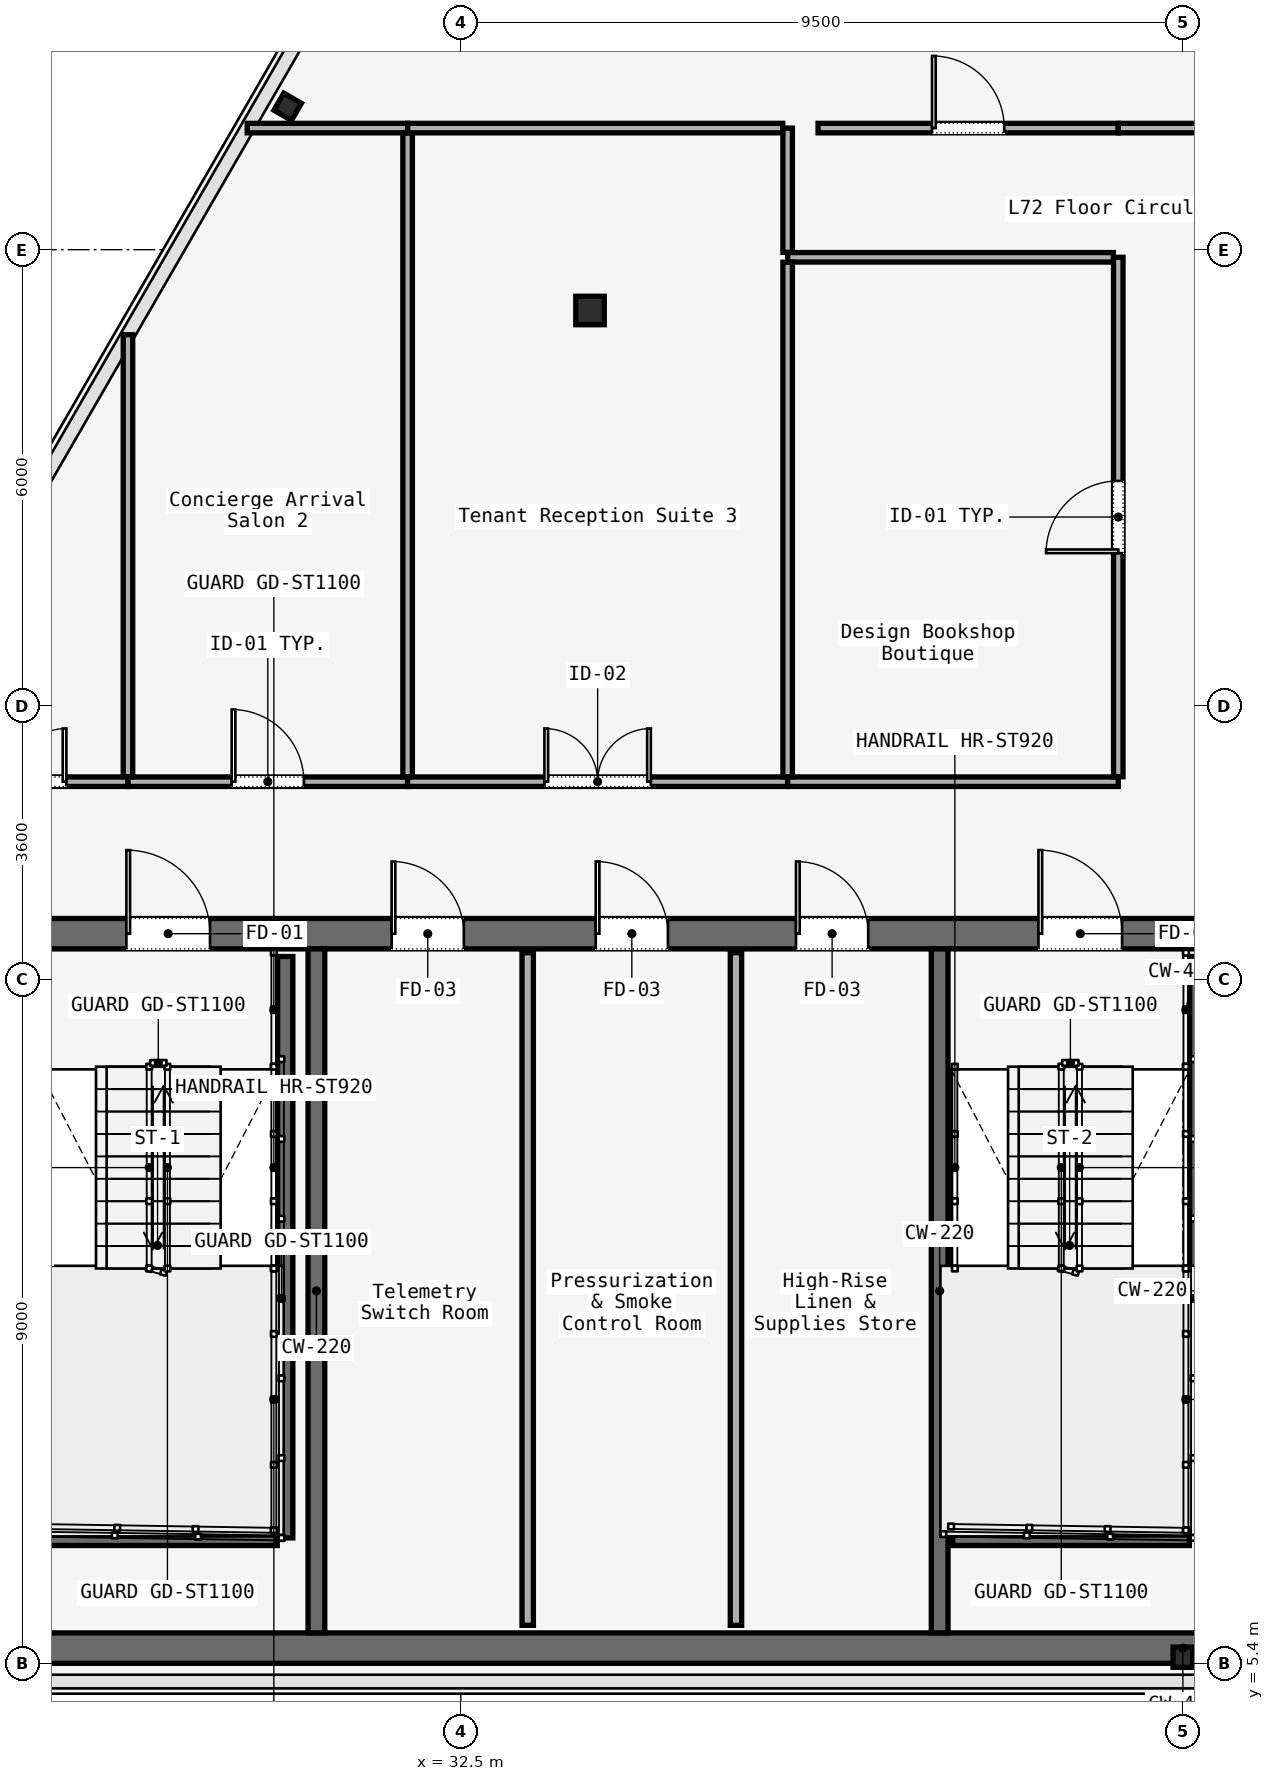
"""IFC4 building model, lengths in metres.
Left out: names, types, materials, properties, quantities, classifications, styles, units other than length and angle.
Written with IfcOpenShell. Run it as: python <this file> out.ifc"""

import sys

from ifc_helpers import new_model, si_unit, direction, frame, frame_2d, origin, origin_2d, place, context, subcontext, project, spatial, rectangle, i_section, extrude, element, fill, save


model = new_model("IFC4")
c1 = context("Model", 3, precision=1e-05, world=origin(), true_north=direction((0.0, 1.0)))
c2 = subcontext(c1, "Body", "Model", "MODEL_VIEW")
j1 = project(units=[si_unit("LENGTHUNIT", "METRE"), si_unit("PLANEANGLEUNIT", "RADIAN")], contexts=[c1])
p1 = place(None, origin())
s1 = spatial("IfcSite", under=j1, at=p1, CompositionType="ELEMENT")
p2 = place(p1, origin())
s2 = spatial("IfcBuilding", under=s1, at=p2, CompositionType="ELEMENT")
p3 = place(p2, frame((0.0, 0.0, 294.7)))
s3 = spatial("IfcBuildingStorey", under=s2, at=p3, CompositionType="ELEMENT", Elevation=294.7)
p4 = place(p3, frame((26.45, 15.0, 0.0), z_axis=(0.0, 0.0, 1.0), x_axis=(1.0, 0.0, 0.0)))
e1 = element("IfcWall", 1, at=p4, inside=s3, PredefinedType="SOLIDWALL", context=c2, shape_type="SweptSolid", body=[
    extrude(rectangle(XDim=31.1, YDim=0.4, at=frame_2d((15.55, 0.0))), origin(), (0.0, 0.0, 1.0), 3.52),
])
p5 = place(p4, frame((1.65, 0.0, 0.0)))
e2 = element("IfcOpeningElement", 2, at=p5, cuts=e1, PredefinedType="OPENING", context=c2, shape_type="SweptSolid", body=[
    extrude(rectangle(XDim=1.1, YDim=2.2, at=frame_2d((0.55, 1.1))), frame((0.0, 0.2, 0.0), z_axis=(0.0, -1.0, 0.0), x_axis=(1.0, 0.0, 0.0)), (0.0, 0.0, 1.0), 0.4),
])
p6 = place(p4, frame((13.65, 0.0, 0.0)))
e3 = element("IfcOpeningElement", 3, at=p6, cuts=e1, PredefinedType="OPENING", context=c2, shape_type="SweptSolid", body=[
    extrude(rectangle(XDim=1.1, YDim=2.2, at=frame_2d((0.55, 1.1))), frame((0.0, 0.2, 0.0), z_axis=(0.0, -1.0, 0.0), x_axis=(1.0, 0.0, 0.0)), (0.0, 0.0, 1.0), 0.4),
])
p7 = place(p4, frame((25.55, 0.0, 0.0)))
e4 = element("IfcOpeningElement", 4, at=p7, cuts=e1, PredefinedType="OPENING", context=c2, shape_type="SweptSolid", body=[
    extrude(rectangle(XDim=1.1, YDim=2.2, at=frame_2d((0.55, 1.1))), frame((0.0, 0.2, 0.0), z_axis=(0.0, -1.0, 0.0), x_axis=(1.0, 0.0, 0.0)), (0.0, 0.0, 1.0), 0.4),
])
p8 = place(p4, frame((19.35, 0.0, 0.0)))
e5 = element("IfcOpeningElement", 5, at=p8, cuts=e1, PredefinedType="OPENING", context=c2, shape_type="SweptSolid", body=[
    extrude(rectangle(XDim=1.1, YDim=2.2, at=frame_2d((0.55, 1.1))), frame((0.0, 0.2, 0.0), z_axis=(0.0, -1.0, 0.0), x_axis=(1.0, 0.0, 0.0)), (0.0, 0.0, 1.0), 0.4),
])
p9 = place(p4, frame((21.4, 0.0, 0.0)))
e6 = element("IfcOpeningElement", 6, at=p9, cuts=e1, PredefinedType="OPENING", context=c2, shape_type="SweptSolid", body=[
    extrude(rectangle(XDim=0.9, YDim=2.1, at=frame_2d((0.45, 1.05))), frame((0.0, 0.2, 0.0), z_axis=(0.0, -1.0, 0.0), x_axis=(1.0, 0.0, 0.0)), (0.0, 0.0, 1.0), 0.4),
])
p10 = place(p4, frame((5.14, 0.0, 0.0)))
e7 = element("IfcOpeningElement", 7, at=p10, cuts=e1, PredefinedType="OPENING", context=c2, shape_type="SweptSolid", body=[
    extrude(rectangle(XDim=0.95, YDim=2.2, at=frame_2d((0.475, 1.1))), frame((0.0, 0.2, 0.0), z_axis=(0.0, -1.0, 0.0), x_axis=(1.0, 0.0, 0.0)), (0.0, 0.0, 1.0), 0.4),
])
p11 = place(p4, frame((7.825, 0.0, 0.0)))
e8 = element("IfcOpeningElement", 8, at=p11, cuts=e1, PredefinedType="OPENING", context=c2, shape_type="SweptSolid", body=[
    extrude(rectangle(XDim=0.95, YDim=2.2, at=frame_2d((0.475, 1.1))), frame((0.0, 0.2, 0.0), z_axis=(0.0, -1.0, 0.0), x_axis=(1.0, 0.0, 0.0)), (0.0, 0.0, 1.0), 0.4),
])
p12 = place(p4, frame((10.46, 0.0, 0.0)))
e9 = element("IfcOpeningElement", 9, at=p12, cuts=e1, PredefinedType="OPENING", context=c2, shape_type="SweptSolid", body=[
    extrude(rectangle(XDim=0.95, YDim=2.2, at=frame_2d((0.475, 1.1))), frame((0.0, 0.2, 0.0), z_axis=(0.0, -1.0, 0.0), x_axis=(1.0, 0.0, 0.0)), (0.0, 0.0, 1.0), 0.4),
])
p13 = place(p4, frame((23.35, 0.0, 0.0)))
e10 = element("IfcOpeningElement", 10, at=p13, cuts=e1, PredefinedType="OPENING", context=c2, shape_type="SweptSolid", body=[
    extrude(rectangle(XDim=1.3, YDim=2.3, at=frame_2d((0.65, 1.15))), frame((0.0, 0.2, 0.0), z_axis=(0.0, -1.0, 0.0), x_axis=(1.0, 0.0, 0.0)), (0.0, 0.0, 1.0), 0.4),
])
p14 = place(p3, frame((26.45, 5.6, 0.0), z_axis=(0.0, 0.0, 1.0), x_axis=(1.0, 0.0, 0.0)))
e11 = element("IfcWall", 11, at=p14, inside=s3, PredefinedType="SOLIDWALL", context=c2, shape_type="SweptSolid", body=[
    extrude(rectangle(XDim=31.1, YDim=0.4, at=frame_2d((15.55, 0.0))), origin(), (0.0, 0.0, 1.0), 3.52),
])
for number, where, z_axis, x_axis in (
    (12, (30.6, 5.8, 0.0), (0.0, 0.0, 1.0), (0.0, 1.0, 0.0)),
    (13, (38.8, 5.8, 0.0), (0.0, 0.0, 1.0), (0.0, 1.0, 0.0)),
):
    element("IfcWall", number, at=place(p3, frame(where, z_axis=z_axis, x_axis=x_axis)), inside=s3, PredefinedType="SOLIDWALL", context=c2, shape_type="SweptSolid", body=[
        extrude(rectangle(XDim=9.0, YDim=0.22, at=frame_2d((4.5, 0.0))), origin(), (0.0, 0.0, 1.0), 3.52),
    ])
p15 = place(p3, frame((34.2, 23.2, 0.0), z_axis=(0.0, 0.0, 1.0), x_axis=(1.0, 0.0, 0.0)))
e14 = element("IfcColumn", 14, at=p15, inside=s3, PredefinedType="COLUMN", context=c2, shape_type="SweptSolid", body=[
    extrude(i_section(OverallWidth=0.375, OverallDepth=0.375, WebThickness=0.017, FlangeThickness=0.027, FilletRadius=0.015, at=origin_2d()), origin(), (0.0, 0.0, 1.0), 3.52),
])
p16 = place(p3, frame((42.0, 5.48, 0.0), z_axis=(0.0, 0.0, 1.0), x_axis=(1.0, 0.0, 0.0)))
e15 = element("IfcColumn", 15, at=p16, inside=s3, PredefinedType="COLUMN", context=c2, shape_type="SweptSolid", body=[
    extrude(i_section(OverallWidth=0.259, OverallDepth=0.267, WebThickness=0.013, FlangeThickness=0.021, FilletRadius=0.013, at=origin_2d()), origin(), (0.0, 0.0, 1.0), 3.52),
])
p17 = place(p3, frame((30.222, 25.881, 0.0), z_axis=(0.022172660725, -0.03838641888, 0.999016944782), x_axis=(0.000225551712, 0.999262773798, 0.038390858658)))
e16 = element("IfcColumn", 16, at=p17, inside=s3, PredefinedType="COLUMN", context=c2, shape_type="SweptSolid", body=[
    extrude(i_section(OverallWidth=0.259, OverallDepth=0.267, WebThickness=0.013, FlangeThickness=0.021, FilletRadius=0.013, at=origin_2d()), origin(), (0.0, 0.0, 1.0), 3.523),
])
p18 = place(p3, frame((30.19, 14.7, 0.0), z_axis=(0.0, 0.0, 1.0), x_axis=(0.0, -1.0, 0.0)))
e17 = element("IfcWall", 17, at=p18, inside=s3, PredefinedType="SOLIDWALL", context=c2, shape_type="SweptSolid", body=[
    extrude(rectangle(XDim=7.65, YDim=0.2, at=frame_2d((3.825, 0.0))), origin(), (0.0, 0.0, 1.0), 3.8),
])
p19 = place(p3, frame((26.97, 7.05, 0.0), z_axis=(0.0, 0.0, 1.0), x_axis=(1.0, 0.0, 0.0)))
e18 = element("IfcWall", 18, at=p19, inside=s3, PredefinedType="SOLIDWALL", context=c2, shape_type="SweptSolid", body=[
    extrude(rectangle(XDim=3.115, YDim=0.2, at=frame_2d((1.558, 0.0))), origin(), (0.0, 0.0, 1.0), 3.8),
])
p20 = place(p3, frame((42.19, 14.7, 0.0), z_axis=(0.0, 0.0, 1.0), x_axis=(0.0, -1.0, 0.0)))
e19 = element("IfcWall", 19, at=p20, inside=s3, PredefinedType="SOLIDWALL", context=c2, shape_type="SweptSolid", body=[
    extrude(rectangle(XDim=7.65, YDim=0.2, at=frame_2d((3.825, 0.0))), origin(), (0.0, 0.0, 1.0), 3.8),
])
p21 = place(p3, frame((38.97, 7.05, 0.0), z_axis=(0.0, 0.0, 1.0), x_axis=(1.0, 0.0, 0.0)))
e20 = element("IfcWall", 20, at=p21, inside=s3, PredefinedType="SOLIDWALL", context=c2, shape_type="SweptSolid", body=[
    extrude(rectangle(XDim=3.115, YDim=0.2, at=frame_2d((1.558, 0.0))), origin(), (0.0, 0.0, 1.0), 3.8),
])
for number, where, z_axis, x_axis in (
    (21, (33.38, 5.9, 0.0), (0.0, 0.0, 1.0), (0.0, 1.0, 0.0)),
    (22, (36.12, 5.9, 0.0), (0.0, 0.0, 1.0), (0.0, 1.0, 0.0)),
):
    element("IfcWall", number, at=place(p3, frame(where, z_axis=z_axis, x_axis=x_axis)), inside=s3, PredefinedType="PARTITIONING", context=c2, shape_type="SweptSolid", body=[
        extrude(rectangle(XDim=8.85, YDim=0.15, at=frame_2d((4.425, 0.0))), origin(), (0.0, 0.0, 1.0), 2.95),
    ])
p22 = place(p3, frame((25.1, 17.0, 0.0), z_axis=(0.0, 0.0, 1.0), x_axis=(1.0, 0.0, 0.0)))
e23 = element("IfcWall", 23, at=p22, inside=s3, PredefinedType="PARTITIONING", context=c2, shape_type="SweptSolid", body=[
    extrude(rectangle(XDim=3.021, YDim=0.125, at=frame_2d((1.51, 0.0))), origin(), (0.0, 0.0, 1.0), 2.95),
])
p23 = place(p22, frame((0.81, 0.0, 0.0)))
e24 = element("IfcOpeningElement", 24, at=p23, cuts=e23, PredefinedType="OPENING", context=c2, shape_type="SweptSolid", body=[
    extrude(rectangle(XDim=1.4, YDim=2.2, at=frame_2d((0.7, 1.1))), frame((0.0, 0.062, 0.0), z_axis=(0.0, -1.0, 0.0), x_axis=(1.0, 0.0, 0.0)), (0.0, 0.0, 1.0), 0.125),
])
p24 = place(p3, frame((28.121, 17.0, 0.0), z_axis=(0.0, 0.0, 1.0), x_axis=(1.0, 0.0, 0.0)))
e25 = element("IfcWall", 25, at=p24, inside=s3, PredefinedType="PARTITIONING", context=c2, shape_type="SweptSolid", body=[
    extrude(rectangle(XDim=3.679, YDim=0.125, at=frame_2d((1.84, 0.0))), origin(), (0.0, 0.0, 1.0), 2.95),
])
p25 = place(p24, frame((1.365, 0.0, 0.0)))
e26 = element("IfcOpeningElement", 26, at=p25, cuts=e25, PredefinedType="OPENING", context=c2, shape_type="SweptSolid", body=[
    extrude(rectangle(XDim=0.95, YDim=2.2, at=frame_2d((0.475, 1.1))), frame((0.0, 0.062, 0.0), z_axis=(0.0, -1.0, 0.0), x_axis=(1.0, 0.0, 0.0)), (0.0, 0.0, 1.0), 0.125),
])
p26 = place(p3, frame((31.8, 17.0, 0.0), z_axis=(0.0, 0.0, 1.0), x_axis=(1.0, 0.0, 0.0)))
e27 = element("IfcWall", 27, at=p26, inside=s3, PredefinedType="PARTITIONING", context=c2, shape_type="SweptSolid", body=[
    extrude(rectangle(XDim=5.0, YDim=0.125, at=frame_2d((2.5, 0.0))), origin(), (0.0, 0.0, 1.0), 2.95),
])
p27 = place(p26, frame((1.8, 0.0, 0.0)))
e28 = element("IfcOpeningElement", 28, at=p27, cuts=e27, PredefinedType="OPENING", context=c2, shape_type="SweptSolid", body=[
    extrude(rectangle(XDim=1.4, YDim=2.2, at=frame_2d((0.7, 1.1))), frame((0.0, 0.062, 0.0), z_axis=(0.0, -1.0, 0.0), x_axis=(1.0, 0.0, 0.0)), (0.0, 0.0, 1.0), 0.125),
])
p28 = place(p3, frame((36.8, 17.0, 0.0), z_axis=(0.0, 0.0, 1.0), x_axis=(1.0, 0.0, 0.0)))
e29 = element("IfcWall", 29, at=p28, inside=s3, PredefinedType="PARTITIONING", context=c2, shape_type="SweptSolid", body=[
    extrude(rectangle(XDim=4.35, YDim=0.125, at=frame_2d((2.175, 0.0))), origin(), (0.0, 0.0, 1.0), 2.95),
])
p29 = place(p3, frame((41.15, 17.065, 0.0), z_axis=(0.0, 0.0, 1.0), x_axis=(0.0, 1.0, 0.0)))
e30 = element("IfcWall", 30, at=p29, inside=s3, PredefinedType="PARTITIONING", context=c2, shape_type="SweptSolid", body=[
    extrude(rectangle(XDim=6.835, YDim=0.125, at=frame_2d((3.417, 0.0))), origin(), (0.0, 0.0, 1.0), 2.95),
])
p30 = place(p29, frame((2.942, 0.0, 0.0)))
e31 = element("IfcOpeningElement", 31, at=p30, cuts=e30, PredefinedType="OPENING", context=c2, shape_type="SweptSolid", body=[
    extrude(rectangle(XDim=0.95, YDim=2.2, at=frame_2d((0.475, 1.1))), frame((0.0, 0.062, 0.0), z_axis=(0.0, -1.0, 0.0), x_axis=(1.0, 0.0, 0.0)), (0.0, 0.0, 1.0), 0.125),
])
p31 = place(p3, frame((41.085, 23.9, 0.0), z_axis=(0.0, 0.0, 1.0), x_axis=(-1.0, 0.0, 0.0)))
e32 = element("IfcWall", 32, at=p31, inside=s3, PredefinedType="PARTITIONING", context=c2, shape_type="SweptSolid", body=[
    extrude(rectangle(XDim=4.285, YDim=0.125, at=frame_2d((2.143, 0.0))), origin(), (0.0, 0.0, 1.0), 2.95),
])
p32 = place(p3, frame((36.8, 23.965, 0.0), z_axis=(0.0, 0.0, 1.0), x_axis=(0.0, 1.0, 0.0)))
e33 = element("IfcWall", 33, at=p32, inside=s3, PredefinedType="PARTITIONING", context=c2, shape_type="SweptSolid", body=[
    extrude(rectangle(XDim=1.635, YDim=0.125, at=frame_2d((0.817, 0.0))), origin(), (0.0, 0.0, 1.0), 2.95),
])
p33 = place(p3, frame((37.2, 25.6, 0.0), z_axis=(0.0, 0.0, 1.0), x_axis=(1.0, 0.0, 0.0)))
e34 = element("IfcWall", 34, at=p33, inside=s3, PredefinedType="PARTITIONING", context=c2, shape_type="SweptSolid", body=[
    extrude(rectangle(XDim=3.95, YDim=0.125, at=frame_2d((1.975, 0.0))), origin(), (0.0, 0.0, 1.0), 2.95),
])
p34 = place(p33, frame((1.5, 0.0, 0.0)))
e35 = element("IfcOpeningElement", 35, at=p34, cuts=e34, PredefinedType="OPENING", context=c2, shape_type="SweptSolid", body=[
    extrude(rectangle(XDim=0.95, YDim=2.2, at=frame_2d((0.475, 1.1))), frame((0.0, 0.062, 0.0), z_axis=(0.0, -1.0, 0.0), x_axis=(1.0, 0.0, 0.0)), (0.0, 0.0, 1.0), 0.125),
])
p35 = place(p3, frame((41.15, 25.6, 0.0), z_axis=(0.0, 0.0, 1.0), x_axis=(1.0, 0.0, 0.0)))
e36 = element("IfcWall", 36, at=p35, inside=s3, PredefinedType="PARTITIONING", context=c2, shape_type="SweptSolid", body=[
    extrude(rectangle(XDim=1.7, YDim=0.125, at=frame_2d((0.85, 0.0))), origin(), (0.0, 0.0, 1.0), 2.95),
])
p36 = place(p3, frame((28.121, 22.882, 0.0), z_axis=(0.0, 0.0, 1.0), x_axis=(0.0, -1.0, 0.0)))
e37 = element("IfcWall", 37, at=p36, inside=s3, PredefinedType="PARTITIONING", context=c2, shape_type="SweptSolid", body=[
    extrude(rectangle(XDim=5.817, YDim=0.125, at=frame_2d((2.909, 0.0))), origin(), (0.0, 0.0, 1.0), 2.95),
])
p37 = place(p3, frame((36.8, 17.065, 0.0), z_axis=(0.0, 0.0, 1.0), x_axis=(0.0, 1.0, 0.0)))
e38 = element("IfcWall", 38, at=p37, inside=s3, PredefinedType="PARTITIONING", context=c2, shape_type="SweptSolid", body=[
    extrude(rectangle(XDim=6.77, YDim=0.125, at=frame_2d((3.385, 0.0))), origin(), (0.0, 0.0, 1.0), 2.95),
])
p38 = place(p3, frame((29.69, 25.6, 0.0), z_axis=(0.0, 0.0, 1.0), x_axis=(1.0, 0.0, 0.0)))
e39 = element("IfcWall", 39, at=p38, inside=s3, PredefinedType="PARTITIONING", context=c2, shape_type="SweptSolid", body=[
    extrude(rectangle(XDim=2.11, YDim=0.125, at=frame_2d((1.055, 0.0))), origin(), (0.0, 0.0, 1.0), 2.95),
])
p39 = place(p3, frame((31.8, 25.535, 0.0), z_axis=(0.0, 0.0, 1.0), x_axis=(0.0, -1.0, 0.0)))
e40 = element("IfcWall", 40, at=p39, inside=s3, PredefinedType="PARTITIONING", context=c2, shape_type="SweptSolid", body=[
    extrude(rectangle(XDim=8.47, YDim=0.125, at=frame_2d((4.235, 0.0))), origin(), (0.0, 0.0, 1.0), 2.95),
])
p40 = place(p3, frame((31.8, 25.6, 0.0), z_axis=(0.0, 0.0, 1.0), x_axis=(1.0, 0.0, 0.0)))
e41 = element("IfcWall", 41, at=p40, inside=s3, PredefinedType="PARTITIONING", context=c2, shape_type="SweptSolid", body=[
    extrude(rectangle(XDim=4.935, YDim=0.125, at=frame_2d((2.468, 0.0))), origin(), (0.0, 0.0, 1.0), 2.95),
])
p41 = place(p5, origin())
e42 = element("IfcDoor", 42, at=p41, inside=s3, OperationType="SINGLE_SWING_LEFT", PredefinedType="DOOR", context=c2, shape_type="SweptSolid", body=[
    extrude(rectangle(XDim=1.1, YDim=2.2, at=frame_2d((0.55, 1.1))), frame((0.0, 0.025, 0.0), z_axis=(0.0, -1.0, 0.0), x_axis=(1.0, 0.0, 0.0)), (0.0, 0.0, 1.0), 0.05),
])
fill(e2, e42)
p42 = place(p6, origin())
e43 = element("IfcDoor", 43, at=p42, inside=s3, OperationType="SINGLE_SWING_RIGHT", PredefinedType="DOOR", context=c2, shape_type="SweptSolid", body=[
    extrude(rectangle(XDim=1.1, YDim=2.2, at=frame_2d((0.55, 1.1))), frame((0.0, 0.025, 0.0), z_axis=(0.0, -1.0, 0.0), x_axis=(1.0, 0.0, 0.0)), (0.0, 0.0, 1.0), 0.05),
])
fill(e3, e43)
p43 = place(p10, origin())
e44 = element("IfcDoor", 44, at=p43, inside=s3, OperationType="SINGLE_SWING_LEFT", PredefinedType="DOOR", context=c2, shape_type="SweptSolid", body=[
    extrude(rectangle(XDim=0.95, YDim=2.2, at=frame_2d((0.475, 1.1))), frame((0.0, 0.025, 0.0), z_axis=(0.0, -1.0, 0.0), x_axis=(1.0, 0.0, 0.0)), (0.0, 0.0, 1.0), 0.05),
])
fill(e7, e44)
p44 = place(p11, origin())
e45 = element("IfcDoor", 45, at=p44, inside=s3, OperationType="SINGLE_SWING_RIGHT", PredefinedType="DOOR", context=c2, shape_type="SweptSolid", body=[
    extrude(rectangle(XDim=0.95, YDim=2.2, at=frame_2d((0.475, 1.1))), frame((0.0, 0.025, 0.0), z_axis=(0.0, -1.0, 0.0), x_axis=(1.0, 0.0, 0.0)), (0.0, 0.0, 1.0), 0.05),
])
fill(e8, e45)
p45 = place(p12, origin())
e46 = element("IfcDoor", 46, at=p45, inside=s3, OperationType="SINGLE_SWING_LEFT", PredefinedType="DOOR", context=c2, shape_type="SweptSolid", body=[
    extrude(rectangle(XDim=0.95, YDim=2.2, at=frame_2d((0.475, 1.1))), frame((0.0, 0.025, 0.0), z_axis=(0.0, -1.0, 0.0), x_axis=(1.0, 0.0, 0.0)), (0.0, 0.0, 1.0), 0.05),
])
fill(e9, e46)
p46 = place(p23, origin())
e47 = element("IfcDoor", 47, at=p46, inside=s3, OperationType="SINGLE_SWING_LEFT", PredefinedType="DOOR", context=c2, shape_type="SweptSolid", body=[
    extrude(rectangle(XDim=1.4, YDim=2.2, at=frame_2d((0.7, 1.1))), frame((0.0, 0.025, 0.0), z_axis=(0.0, -1.0, 0.0), x_axis=(1.0, 0.0, 0.0)), (0.0, 0.0, 1.0), 0.05),
])
fill(e24, e47)
p47 = place(p30, origin())
e48 = element("IfcDoor", 48, at=p47, inside=s3, OperationType="SINGLE_SWING_RIGHT", PredefinedType="DOOR", context=c2, shape_type="SweptSolid", body=[
    extrude(rectangle(XDim=0.95, YDim=2.2, at=frame_2d((0.475, 1.1))), frame((0.0, 0.025, 0.0), z_axis=(0.0, -1.0, 0.0), x_axis=(1.0, 0.0, 0.0)), (0.0, 0.0, 1.0), 0.05),
])
fill(e31, e48)
p48 = place(p25, origin())
e49 = element("IfcDoor", 49, at=p48, inside=s3, OperationType="SINGLE_SWING_LEFT", PredefinedType="DOOR", context=c2, shape_type="SweptSolid", body=[
    extrude(rectangle(XDim=0.95, YDim=2.2, at=frame_2d((0.475, 1.1))), frame((0.0, 0.025, 0.0), z_axis=(0.0, -1.0, 0.0), x_axis=(1.0, 0.0, 0.0)), (0.0, 0.0, 1.0), 0.05),
])
fill(e26, e49)
p49 = place(p27, origin())
e50 = element("IfcDoor", 50, at=p49, inside=s3, OperationType="SINGLE_SWING_RIGHT", PredefinedType="DOOR", context=c2, shape_type="SweptSolid", body=[
    extrude(rectangle(XDim=1.4, YDim=2.2, at=frame_2d((0.7, 1.1))), frame((0.0, 0.025, 0.0), z_axis=(0.0, -1.0, 0.0), x_axis=(1.0, 0.0, 0.0)), (0.0, 0.0, 1.0), 0.05),
])
fill(e28, e50)
p50 = place(p34, origin())
e51 = element("IfcDoor", 51, at=p50, inside=s3, OperationType="SINGLE_SWING_RIGHT", PredefinedType="DOOR", context=c2, shape_type="SweptSolid", body=[
    extrude(rectangle(XDim=0.95, YDim=2.2, at=frame_2d((0.475, 1.1))), frame((0.0, 0.025, 0.0), z_axis=(0.0, -1.0, 0.0), x_axis=(1.0, 0.0, 0.0)), (0.0, 0.0, 1.0), 0.05),
])
fill(e35, e51)
save(model, sys.argv[1])
